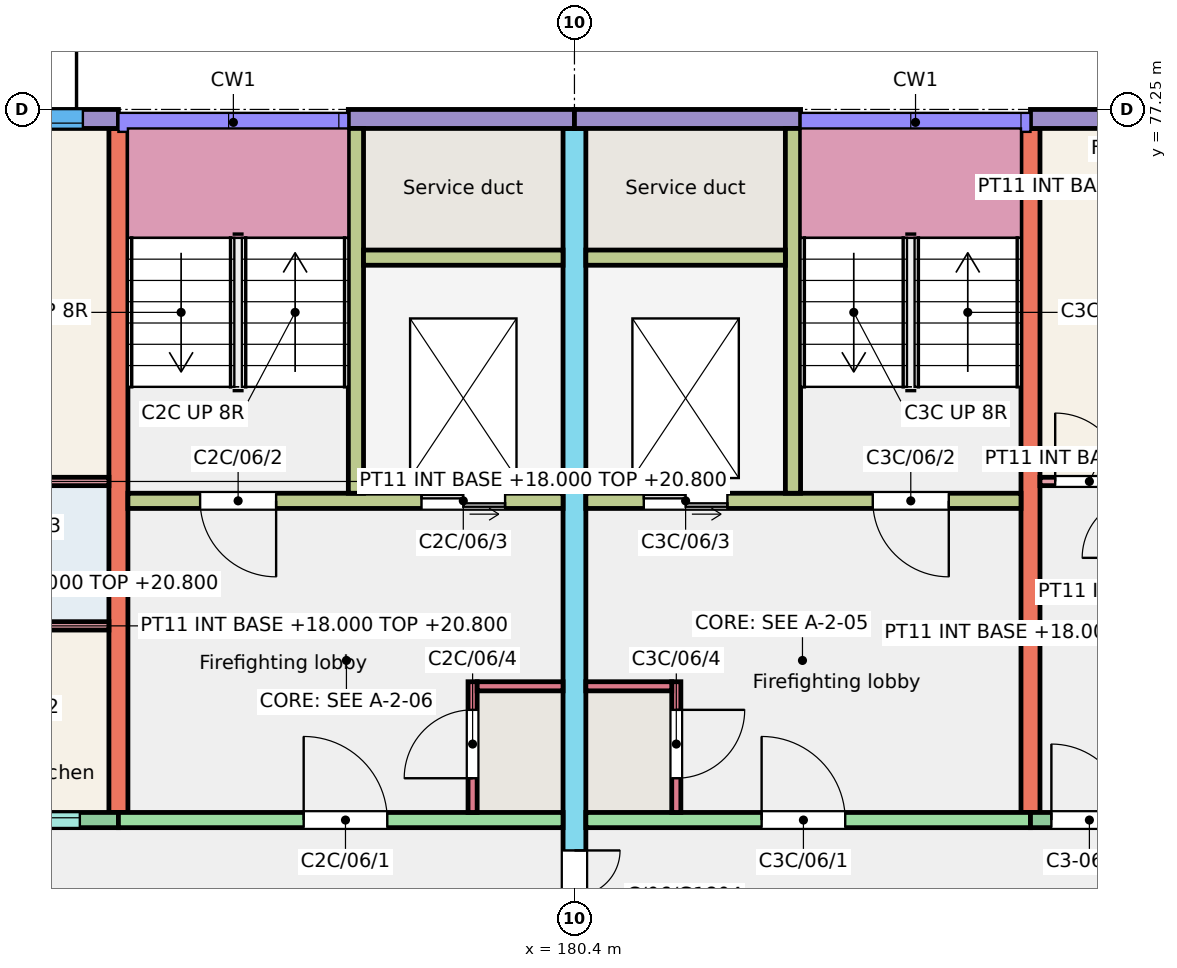
"""IFC4 building model, lengths in metres.
Left out: names, types, materials, properties, quantities, classifications, styles, units other than length and angle.
Written with IfcOpenShell. Run it as: python <this file> out.ifc"""

import sys

from ifc_helpers import new_model, si_unit, direction, frame, frame_2d, origin, place, context, subcontext, project, spatial, rectangle, extrude, element, fill, save


model = new_model("IFC4")
c1 = context("Model", 3, precision=1e-05, world=origin(), true_north=direction((0.0, 1.0)))
c2 = subcontext(c1, "Body", "Model", "MODEL_VIEW")
j1 = project(units=[si_unit("LENGTHUNIT", "METRE"), si_unit("PLANEANGLEUNIT", "RADIAN")], contexts=[c1])
p1 = place(None, origin())
s1 = spatial("IfcSite", under=j1, at=p1, CompositionType="ELEMENT")
p2 = place(p1, origin())
s2 = spatial("IfcBuilding", under=s1, at=p2, CompositionType="ELEMENT")
p3 = place(p2, frame((0.0, 0.0, 18.0)))
s3 = spatial("IfcBuildingStorey", under=s2, at=p3, CompositionType="ELEMENT", Elevation=18.0)
p4 = place(p3, frame((174.4, 68.0, 0.0), z_axis=(0.0, 0.0, 1.0), x_axis=(0.0, 1.0, 0.0)))
e1 = element("IfcWall", 1, at=p4, inside=s3, PredefinedType="SHEAR", context=c2, shape_type="SweptSolid", body=[
    extrude(rectangle(XDim=9.0, YDim=0.25, at=frame_2d((4.5, 0.0))), origin(), (0.0, 0.0, 1.0), 3.0),
])
p5 = place(p3, frame((180.4, 66.0, 0.0), z_axis=(0.0, 0.0, 1.0), x_axis=(0.0, 1.0, 0.0)))
e2 = element("IfcWall", 2, at=p5, inside=s3, PredefinedType="SHEAR", context=c2, shape_type="SweptSolid", body=[
    extrude(rectangle(XDim=11.0, YDim=0.3, at=frame_2d((5.5, 0.0))), origin(), (0.0, 0.0, 1.0), 3.0),
])
p6 = place(p5, frame((0.3, 0.0, 0.0)))
e3 = element("IfcOpeningElement", 3, at=p6, cuts=e2, PredefinedType="OPENING", context=c2, shape_type="SweptSolid", body=[
    extrude(rectangle(XDim=1.2, YDim=2.1, at=frame_2d((0.6, 1.05))), frame((0.0, 0.16, 0.0), z_axis=(0.0, -1.0, 0.0), x_axis=(1.0, 0.0, 0.0)), (0.0, 0.0, 1.0), 0.32),
])
p7 = place(p3, frame((186.4, 68.0, 0.0), z_axis=(0.0, 0.0, 1.0), x_axis=(0.0, 1.0, 0.0)))
e4 = element("IfcWall", 4, at=p7, inside=s3, PredefinedType="SHEAR", context=c2, shape_type="SweptSolid", body=[
    extrude(rectangle(XDim=9.0, YDim=0.25, at=frame_2d((4.5, 0.0))), origin(), (0.0, 0.0, 1.0), 3.0),
])
p8 = place(p3, frame((170.8, 77.125, 0.0), z_axis=(0.0, 0.0, 1.0), x_axis=(1.0, 0.0, 0.0)))
e5 = element("IfcWall", 5, at=p8, inside=s3, PredefinedType="SOLIDWALL", context=c2, shape_type="SweptSolid", body=[
    extrude(rectangle(XDim=3.6, YDim=0.25, at=frame_2d((1.8, 0.0))), origin(), (0.0, 0.0, 1.0), 3.0),
])
p9 = place(p8, frame((1.633, 0.0, 0.9)))
e6 = element("IfcOpeningElement", 6, at=p9, cuts=e5, PredefinedType="OPENING", context=c2, shape_type="SweptSolid", body=[
    extrude(rectangle(XDim=1.5, YDim=1.5, at=frame_2d((0.75, 0.75))), frame((0.0, 0.135, 0.0), z_axis=(0.0, -1.0, 0.0), x_axis=(1.0, 0.0, 0.0)), (0.0, 0.0, 1.0), 0.27),
])
p10 = place(p8, frame((0.19, 0.0, 0.0)))
e7 = element("IfcOpeningElement", 7, at=p10, cuts=e5, PredefinedType="OPENING", context=c2, shape_type="SweptSolid", body=[
    extrude(rectangle(XDim=1.0, YDim=2.1, at=frame_2d((0.5, 1.05))), frame((0.0, 0.135, 0.0), z_axis=(0.0, -1.0, 0.0), x_axis=(1.0, 0.0, 0.0)), (0.0, 0.0, 1.0), 0.27),
])
p11 = place(p3, frame((170.8, 67.9, 0.0), z_axis=(0.0, 0.0, 1.0), x_axis=(1.0, 0.0, 0.0)))
e8 = element("IfcWall", 8, at=p11, inside=s3, PredefinedType="SOLIDWALL", context=c2, shape_type="SweptSolid", body=[
    extrude(rectangle(XDim=3.6, YDim=0.2, at=frame_2d((1.8, 0.0))), origin(), (0.0, 0.0, 1.0), 3.0),
])
p12 = place(p11, frame((1.893, 0.0, 1.1)))
e9 = element("IfcOpeningElement", 9, at=p12, cuts=e8, PredefinedType="OPENING", context=c2, shape_type="SweptSolid", body=[
    extrude(rectangle(XDim=1.2, YDim=1.3, at=frame_2d((0.6, 0.65))), frame((0.0, 0.11, 0.0), z_axis=(0.0, -1.0, 0.0), x_axis=(1.0, 0.0, 0.0)), (0.0, 0.0, 1.0), 0.22),
])
p13 = place(p11, frame((0.25, 0.0, 0.0)))
e10 = element("IfcOpeningElement", 10, at=p13, cuts=e8, PredefinedType="OPENING", context=c2, shape_type="SweptSolid", body=[
    extrude(rectangle(XDim=1.0, YDim=2.1, at=frame_2d((0.5, 1.05))), frame((0.0, 0.11, 0.0), z_axis=(0.0, -1.0, 0.0), x_axis=(1.0, 0.0, 0.0)), (0.0, 0.0, 1.0), 0.22),
])
p14 = place(p3, frame((177.425, 77.125, 0.0), z_axis=(0.0, 0.0, 1.0), x_axis=(1.0, 0.0, 0.0)))
e11 = element("IfcWall", 11, at=p14, inside=s3, PredefinedType="SOLIDWALL", context=c2, shape_type="SweptSolid", body=[
    extrude(rectangle(XDim=2.975, YDim=0.25, at=frame_2d((1.487, 0.0))), origin(), (0.0, 0.0, 1.0), 3.0),
])
p15 = place(p3, frame((174.4, 67.9, 0.0), z_axis=(0.0, 0.0, 1.0), x_axis=(1.0, 0.0, 0.0)))
e12 = element("IfcWall", 12, at=p15, inside=s3, PredefinedType="SHEAR", context=c2, shape_type="SweptSolid", body=[
    extrude(rectangle(XDim=5.85, YDim=0.2, at=frame_2d((2.925, 0.0))), origin(), (0.0, 0.0, 1.0), 3.0),
])
p16 = place(p15, frame((2.438, 0.0, 0.0)))
e13 = element("IfcOpeningElement", 13, at=p16, cuts=e12, PredefinedType="OPENING", context=c2, shape_type="SweptSolid", body=[
    extrude(rectangle(XDim=1.1, YDim=2.1, at=frame_2d((0.55, 1.05))), frame((0.0, 0.11, 0.0), z_axis=(0.0, -1.0, 0.0), x_axis=(1.0, 0.0, 0.0)), (0.0, 0.0, 1.0), 0.22),
])
p17 = place(p3, frame((174.525, 72.1, 0.0), z_axis=(0.0, 0.0, 1.0), x_axis=(1.0, 0.0, 0.0)))
e14 = element("IfcWall", 14, at=p17, inside=s3, PredefinedType="SHEAR", context=c2, shape_type="SweptSolid", body=[
    extrude(rectangle(XDim=5.725, YDim=0.2, at=frame_2d((2.863, 0.0))), origin(), (0.0, 0.0, 1.0), 3.0),
])
p18 = place(p17, frame((0.95, 0.0, 0.0)))
e15 = element("IfcOpeningElement", 15, at=p18, cuts=e14, PredefinedType="OPENING", context=c2, shape_type="SweptSolid", body=[
    extrude(rectangle(XDim=1.0, YDim=2.1, at=frame_2d((0.5, 1.05))), frame((0.0, 0.11, 0.0), z_axis=(0.0, -1.0, 0.0), x_axis=(1.0, 0.0, 0.0)), (0.0, 0.0, 1.0), 0.22),
])
p19 = place(p17, frame((3.863, 0.0, 0.0)))
e16 = element("IfcOpeningElement", 16, at=p19, cuts=e14, PredefinedType="OPENING", context=c2, shape_type="SweptSolid", body=[
    extrude(rectangle(XDim=1.1, YDim=2.1, at=frame_2d((0.55, 1.05))), frame((0.0, 0.11, 0.0), z_axis=(0.0, -1.0, 0.0), x_axis=(1.0, 0.0, 0.0)), (0.0, 0.0, 1.0), 0.22),
])
p20 = place(p3, frame((177.525, 72.2, 0.0), z_axis=(0.0, 0.0, 1.0), x_axis=(0.0, 1.0, 0.0)))
e17 = element("IfcWall", 17, at=p20, inside=s3, PredefinedType="SHEAR", context=c2, shape_type="SweptSolid", body=[
    extrude(rectangle(XDim=4.8, YDim=0.2, at=frame_2d((2.4, 0.0))), origin(), (0.0, 0.0, 1.0), 3.0),
])
p21 = place(p3, frame((177.625, 75.3, 0.0), z_axis=(0.0, 0.0, 1.0), x_axis=(1.0, 0.0, 0.0)))
e18 = element("IfcWall", 18, at=p21, inside=s3, PredefinedType="SHEAR", context=c2, shape_type="SweptSolid", body=[
    extrude(rectangle(XDim=2.625, YDim=0.2, at=frame_2d((1.312, 0.0))), origin(), (0.0, 0.0, 1.0), 3.0),
])
p22 = place(p3, frame((179.06, 68.0, 0.0), z_axis=(0.0, 0.0, 1.0), x_axis=(0.0, 1.0, 0.0)))
e19 = element("IfcWall", 19, at=p22, inside=s3, PredefinedType="SHEAR", context=c2, shape_type="SweptSolid", body=[
    extrude(rectangle(XDim=1.72, YDim=0.12, at=frame_2d((0.86, 0.0))), origin(), (0.0, 0.0, 1.0), 3.0),
])
p23 = place(p22, frame((0.45, 0.0, 0.0)))
e20 = element("IfcOpeningElement", 20, at=p23, cuts=e19, PredefinedType="OPENING", context=c2, shape_type="SweptSolid", body=[
    extrude(rectangle(XDim=0.9, YDim=2.1, at=frame_2d((0.45, 1.05))), frame((0.0, 0.07, 0.0), z_axis=(0.0, -1.0, 0.0), x_axis=(1.0, 0.0, 0.0)), (0.0, 0.0, 1.0), 0.14),
])
p24 = place(p3, frame((179.12, 69.66, 0.0), z_axis=(0.0, 0.0, 1.0), x_axis=(1.0, 0.0, 0.0)))
e21 = element("IfcWall", 21, at=p24, inside=s3, PredefinedType="SHEAR", context=c2, shape_type="SweptSolid", body=[
    extrude(rectangle(XDim=1.13, YDim=0.12, at=frame_2d((0.565, 0.0))), origin(), (0.0, 0.0, 1.0), 3.0),
])
p25 = place(p3, frame((180.4, 77.125, 0.0), z_axis=(0.0, 0.0, 1.0), x_axis=(1.0, 0.0, 0.0)))
e22 = element("IfcWall", 22, at=p25, inside=s3, PredefinedType="SOLIDWALL", context=c2, shape_type="SweptSolid", body=[
    extrude(rectangle(XDim=2.975, YDim=0.25, at=frame_2d((1.488, 0.0))), origin(), (0.0, 0.0, 1.0), 3.0),
])
p26 = place(p3, frame((180.55, 67.9, 0.0), z_axis=(0.0, 0.0, 1.0), x_axis=(1.0, 0.0, 0.0)))
e23 = element("IfcWall", 23, at=p26, inside=s3, PredefinedType="SHEAR", context=c2, shape_type="SweptSolid", body=[
    extrude(rectangle(XDim=5.85, YDim=0.2, at=frame_2d((2.925, 0.0))), origin(), (0.0, 0.0, 1.0), 3.0),
])
p27 = place(p26, frame((2.312, 0.0, 0.0)))
e24 = element("IfcOpeningElement", 24, at=p27, cuts=e23, PredefinedType="OPENING", context=c2, shape_type="SweptSolid", body=[
    extrude(rectangle(XDim=1.1, YDim=2.1, at=frame_2d((0.55, 1.05))), frame((0.0, 0.11, 0.0), z_axis=(0.0, -1.0, 0.0), x_axis=(1.0, 0.0, 0.0)), (0.0, 0.0, 1.0), 0.22),
])
p28 = place(p3, frame((180.55, 72.1, 0.0), z_axis=(0.0, 0.0, 1.0), x_axis=(1.0, 0.0, 0.0)))
e25 = element("IfcWall", 25, at=p28, inside=s3, PredefinedType="SHEAR", context=c2, shape_type="SweptSolid", body=[
    extrude(rectangle(XDim=5.725, YDim=0.2, at=frame_2d((2.862, 0.0))), origin(), (0.0, 0.0, 1.0), 3.0),
])
p29 = place(p28, frame((3.775, 0.0, 0.0)))
e26 = element("IfcOpeningElement", 26, at=p29, cuts=e25, PredefinedType="OPENING", context=c2, shape_type="SweptSolid", body=[
    extrude(rectangle(XDim=1.0, YDim=2.1, at=frame_2d((0.5, 1.05))), frame((0.0, 0.11, 0.0), z_axis=(0.0, -1.0, 0.0), x_axis=(1.0, 0.0, 0.0)), (0.0, 0.0, 1.0), 0.22),
])
p30 = place(p28, frame((0.762, 0.0, 0.0)))
e27 = element("IfcOpeningElement", 27, at=p30, cuts=e25, PredefinedType="OPENING", context=c2, shape_type="SweptSolid", body=[
    extrude(rectangle(XDim=1.1, YDim=2.1, at=frame_2d((0.55, 1.05))), frame((0.0, 0.11, 0.0), z_axis=(0.0, -1.0, 0.0), x_axis=(1.0, 0.0, 0.0)), (0.0, 0.0, 1.0), 0.22),
])
p31 = place(p3, frame((183.275, 72.2, 0.0), z_axis=(0.0, 0.0, 1.0), x_axis=(0.0, 1.0, 0.0)))
e28 = element("IfcWall", 28, at=p31, inside=s3, PredefinedType="SHEAR", context=c2, shape_type="SweptSolid", body=[
    extrude(rectangle(XDim=4.8, YDim=0.2, at=frame_2d((2.4, 0.0))), origin(), (0.0, 0.0, 1.0), 3.0),
])
p32 = place(p3, frame((180.55, 75.3, 0.0), z_axis=(0.0, 0.0, 1.0), x_axis=(1.0, 0.0, 0.0)))
e29 = element("IfcWall", 29, at=p32, inside=s3, PredefinedType="SHEAR", context=c2, shape_type="SweptSolid", body=[
    extrude(rectangle(XDim=2.625, YDim=0.2, at=frame_2d((1.312, 0.0))), origin(), (0.0, 0.0, 1.0), 3.0),
])
p33 = place(p3, frame((181.74, 68.0, 0.0), z_axis=(0.0, 0.0, 1.0), x_axis=(0.0, 1.0, 0.0)))
e30 = element("IfcWall", 30, at=p33, inside=s3, PredefinedType="SHEAR", context=c2, shape_type="SweptSolid", body=[
    extrude(rectangle(XDim=1.72, YDim=0.12, at=frame_2d((0.86, 0.0))), origin(), (0.0, 0.0, 1.0), 3.0),
])
p34 = place(p33, frame((0.45, 0.0, 0.0)))
e31 = element("IfcOpeningElement", 31, at=p34, cuts=e30, PredefinedType="OPENING", context=c2, shape_type="SweptSolid", body=[
    extrude(rectangle(XDim=0.9, YDim=2.1, at=frame_2d((0.45, 1.05))), frame((0.0, 0.07, 0.0), z_axis=(0.0, -1.0, 0.0), x_axis=(1.0, 0.0, 0.0)), (0.0, 0.0, 1.0), 0.14),
])
p35 = place(p3, frame((180.55, 69.66, 0.0), z_axis=(0.0, 0.0, 1.0), x_axis=(1.0, 0.0, 0.0)))
e32 = element("IfcWall", 32, at=p35, inside=s3, PredefinedType="SHEAR", context=c2, shape_type="SweptSolid", body=[
    extrude(rectangle(XDim=1.13, YDim=0.12, at=frame_2d((0.565, 0.0))), origin(), (0.0, 0.0, 1.0), 3.0),
])
p36 = place(p3, frame((186.4, 77.125, 0.0), z_axis=(0.0, 0.0, 1.0), x_axis=(1.0, 0.0, 0.0)))
e33 = element("IfcWall", 33, at=p36, inside=s3, PredefinedType="SOLIDWALL", context=c2, shape_type="SweptSolid", body=[
    extrude(rectangle(XDim=3.6, YDim=0.25, at=frame_2d((1.8, 0.0))), origin(), (0.0, 0.0, 1.0), 3.0),
])
p37 = place(p36, frame((1.062, 0.0, 0.9)))
e34 = element("IfcOpeningElement", 34, at=p37, cuts=e33, PredefinedType="OPENING", context=c2, shape_type="SweptSolid", body=[
    extrude(rectangle(XDim=1.5, YDim=1.5, at=frame_2d((0.75, 0.75))), frame((0.0, 0.135, 0.0), z_axis=(0.0, -1.0, 0.0), x_axis=(1.0, 0.0, 0.0)), (0.0, 0.0, 1.0), 0.27),
])
p38 = place(p3, frame((186.4, 67.9, 0.0), z_axis=(0.0, 0.0, 1.0), x_axis=(1.0, 0.0, 0.0)))
e35 = element("IfcWall", 35, at=p38, inside=s3, PredefinedType="SOLIDWALL", context=c2, shape_type="SweptSolid", body=[
    extrude(rectangle(XDim=3.6, YDim=0.2, at=frame_2d((1.8, 0.0))), origin(), (0.0, 0.0, 1.0), 3.0),
])
p39 = place(p38, frame((1.917, 0.0, 1.1)))
e36 = element("IfcOpeningElement", 36, at=p39, cuts=e35, PredefinedType="OPENING", context=c2, shape_type="SweptSolid", body=[
    extrude(rectangle(XDim=1.2, YDim=1.3, at=frame_2d((0.6, 0.65))), frame((0.0, 0.11, 0.0), z_axis=(0.0, -1.0, 0.0), x_axis=(1.0, 0.0, 0.0)), (0.0, 0.0, 1.0), 0.22),
])
p40 = place(p38, frame((0.275, 0.0, 0.0)))
e37 = element("IfcOpeningElement", 37, at=p40, cuts=e35, PredefinedType="OPENING", context=c2, shape_type="SweptSolid", body=[
    extrude(rectangle(XDim=1.0, YDim=2.1, at=frame_2d((0.5, 1.05))), frame((0.0, 0.11, 0.0), z_axis=(0.0, -1.0, 0.0), x_axis=(1.0, 0.0, 0.0)), (0.0, 0.0, 1.0), 0.22),
])
p41 = place(p3, frame((172.31, 70.455, 0.0), z_axis=(0.0, 0.0, 1.0), x_axis=(1.0, 0.0, 0.0)))
e38 = element("IfcWall", 38, at=p41, inside=s3, PredefinedType="PARTITIONING", context=c2, shape_type="SweptSolid", body=[
    extrude(rectangle(XDim=1.965, YDim=0.11, at=frame_2d((0.982, 0.0))), origin(), (0.0, 0.0, 1.0), 2.8),
])
p42 = place(p3, frame((170.9, 72.355, 0.0), z_axis=(0.0, 0.0, 1.0), x_axis=(1.0, 0.0, 0.0)))
e39 = element("IfcWall", 39, at=p42, inside=s3, PredefinedType="PARTITIONING", context=c2, shape_type="SweptSolid", body=[
    extrude(rectangle(XDim=3.375, YDim=0.11, at=frame_2d((1.688, 0.0))), origin(), (0.0, 0.0, 1.0), 2.8),
])
p43 = place(p42, frame((0.2, 0.0, 0.0)))
e40 = element("IfcOpeningElement", 40, at=p43, cuts=e39, PredefinedType="OPENING", context=c2, shape_type="SweptSolid", body=[
    extrude(rectangle(XDim=0.9, YDim=2.1, at=frame_2d((0.45, 1.05))), frame((0.0, 0.065, 0.0), z_axis=(0.0, -1.0, 0.0), x_axis=(1.0, 0.0, 0.0)), (0.0, 0.0, 1.0), 0.13),
])
p44 = place(p3, frame((186.525, 72.355, 0.0), z_axis=(0.0, 0.0, 1.0), x_axis=(1.0, 0.0, 0.0)))
e41 = element("IfcWall", 41, at=p44, inside=s3, PredefinedType="PARTITIONING", context=c2, shape_type="SweptSolid", body=[
    extrude(rectangle(XDim=3.375, YDim=0.11, at=frame_2d((1.688, 0.0))), origin(), (0.0, 0.0, 1.0), 2.8),
])
p45 = place(p44, frame((0.2, 0.0, 0.0)))
e42 = element("IfcOpeningElement", 42, at=p45, cuts=e41, PredefinedType="OPENING", context=c2, shape_type="SweptSolid", body=[
    extrude(rectangle(XDim=0.9, YDim=2.1, at=frame_2d((0.45, 1.05))), frame((0.0, 0.065, 0.0), z_axis=(0.0, -1.0, 0.0), x_axis=(1.0, 0.0, 0.0)), (0.0, 0.0, 1.0), 0.13),
])
p46 = place(p12, origin())
e43 = element("IfcWindow", 43, at=p46, inside=s3, PartitioningType="SINGLE_PANEL", PredefinedType="WINDOW", context=c2, shape_type="SweptSolid", body=[
    extrude(rectangle(XDim=1.2, YDim=1.3, at=frame_2d((0.6, 0.65))), frame((0.0, 0.06, 0.0), z_axis=(0.0, -1.0, 0.0), x_axis=(1.0, 0.0, 0.0)), (0.0, 0.0, 1.0), 0.06),
])
fill(e9, e43)
p47 = place(p9, origin())
e44 = element("IfcWindow", 44, at=p47, inside=s3, PartitioningType="SINGLE_PANEL", PredefinedType="WINDOW", context=c2, shape_type="SweptSolid", body=[
    extrude(rectangle(XDim=1.5, YDim=1.5, at=frame_2d((0.75, 0.75))), frame((0.0, -0.025, 0.0), z_axis=(0.0, -1.0, 0.0), x_axis=(1.0, 0.0, 0.0)), (0.0, 0.0, 1.0), 0.06),
])
fill(e6, e44)
p48 = place(p40, origin())
e45 = element("IfcDoor", 45, at=p48, inside=s3, OperationType="SINGLE_SWING_LEFT", PredefinedType="DOOR", context=c2, shape_type="SweptSolid", body=[
    extrude(rectangle(XDim=1.0, YDim=2.1, at=frame_2d((0.5, 1.05))), frame((0.0, 0.025, 0.0), z_axis=(0.0, -1.0, 0.0), x_axis=(1.0, 0.0, 0.0)), (0.0, 0.0, 1.0), 0.05),
])
fill(e37, e45)
p49 = place(p45, origin())
e46 = element("IfcDoor", 46, at=p49, inside=s3, OperationType="SINGLE_SWING_LEFT", PredefinedType="DOOR", context=c2, shape_type="SweptSolid", body=[
    extrude(rectangle(XDim=0.9, YDim=2.1, at=frame_2d((0.45, 1.05))), frame((0.0, 0.025, 0.0), z_axis=(0.0, -1.0, 0.0), x_axis=(1.0, 0.0, 0.0)), (0.0, 0.0, 1.0), 0.05),
])
fill(e42, e46)
p50 = place(p16, origin())
e47 = element("IfcDoor", 47, at=p50, inside=s3, OperationType="SINGLE_SWING_LEFT", PredefinedType="DOOR", context=c2, shape_type="SweptSolid", body=[
    extrude(rectangle(XDim=1.1, YDim=2.1, at=frame_2d((0.55, 1.05))), frame((0.0, 0.025, 0.0), z_axis=(0.0, -1.0, 0.0), x_axis=(1.0, 0.0, 0.0)), (0.0, 0.0, 1.0), 0.05),
])
fill(e13, e47)
p51 = place(p18, origin())
e48 = element("IfcDoor", 48, at=p51, inside=s3, OperationType="SINGLE_SWING_RIGHT", PredefinedType="DOOR", context=c2, shape_type="SweptSolid", body=[
    extrude(rectangle(XDim=1.0, YDim=2.1, at=frame_2d((0.5, 1.05))), frame((0.0, 0.025, 0.0), z_axis=(0.0, -1.0, 0.0), x_axis=(1.0, 0.0, 0.0)), (0.0, 0.0, 1.0), 0.05),
])
fill(e15, e48)
p52 = place(p19, origin())
e49 = element("IfcDoor", 49, at=p52, inside=s3, OperationType="DOUBLE_DOOR_SLIDING", PredefinedType="DOOR", context=c2, shape_type="SweptSolid", body=[
    extrude(rectangle(XDim=1.1, YDim=2.1, at=frame_2d((0.55, 1.05))), frame((0.0, 0.025, 0.0), z_axis=(0.0, -1.0, 0.0), x_axis=(1.0, 0.0, 0.0)), (0.0, 0.0, 1.0), 0.05),
])
fill(e16, e49)
p53 = place(p23, origin())
e50 = element("IfcDoor", 50, at=p53, inside=s3, OperationType="SINGLE_SWING_LEFT", PredefinedType="DOOR", context=c2, shape_type="SweptSolid", body=[
    extrude(rectangle(XDim=0.9, YDim=2.1, at=frame_2d((0.45, 1.05))), frame((0.0, 0.025, 0.0), z_axis=(0.0, -1.0, 0.0), x_axis=(1.0, 0.0, 0.0)), (0.0, 0.0, 1.0), 0.05),
])
fill(e20, e50)
p54 = place(p27, origin())
e51 = element("IfcDoor", 51, at=p54, inside=s3, OperationType="SINGLE_SWING_LEFT", PredefinedType="DOOR", context=c2, shape_type="SweptSolid", body=[
    extrude(rectangle(XDim=1.1, YDim=2.1, at=frame_2d((0.55, 1.05))), frame((0.0, 0.025, 0.0), z_axis=(0.0, -1.0, 0.0), x_axis=(1.0, 0.0, 0.0)), (0.0, 0.0, 1.0), 0.05),
])
fill(e24, e51)
p55 = place(p29, origin())
e52 = element("IfcDoor", 52, at=p55, inside=s3, OperationType="SINGLE_SWING_RIGHT", PredefinedType="DOOR", context=c2, shape_type="SweptSolid", body=[
    extrude(rectangle(XDim=1.0, YDim=2.1, at=frame_2d((0.5, 1.05))), frame((0.0, 0.025, 0.0), z_axis=(0.0, -1.0, 0.0), x_axis=(1.0, 0.0, 0.0)), (0.0, 0.0, 1.0), 0.05),
])
fill(e26, e52)
p56 = place(p30, origin())
e53 = element("IfcDoor", 53, at=p56, inside=s3, OperationType="DOUBLE_DOOR_SLIDING", PredefinedType="DOOR", context=c2, shape_type="SweptSolid", body=[
    extrude(rectangle(XDim=1.1, YDim=2.1, at=frame_2d((0.55, 1.05))), frame((0.0, 0.025, 0.0), z_axis=(0.0, -1.0, 0.0), x_axis=(1.0, 0.0, 0.0)), (0.0, 0.0, 1.0), 0.05),
])
fill(e27, e53)
p57 = place(p34, origin())
e54 = element("IfcDoor", 54, at=p57, inside=s3, OperationType="SINGLE_SWING_RIGHT", PredefinedType="DOOR", context=c2, shape_type="SweptSolid", body=[
    extrude(rectangle(XDim=0.9, YDim=2.1, at=frame_2d((0.45, 1.05))), frame((0.0, 0.025, 0.0), z_axis=(0.0, -1.0, 0.0), x_axis=(1.0, 0.0, 0.0)), (0.0, 0.0, 1.0), 0.05),
])
fill(e31, e54)
p58 = place(p6, origin())
e55 = element("IfcDoor", 55, at=p58, inside=s3, OperationType="DOUBLE_DOOR_SINGLE_SWING", PredefinedType="DOOR", context=c2, shape_type="SweptSolid", body=[
    extrude(rectangle(XDim=1.2, YDim=2.1, at=frame_2d((0.6, 1.05))), frame((0.0, 0.025, 0.0), z_axis=(0.0, -1.0, 0.0), x_axis=(1.0, 0.0, 0.0)), (0.0, 0.0, 1.0), 0.05),
])
fill(e3, e55)
save(model, sys.argv[1])
